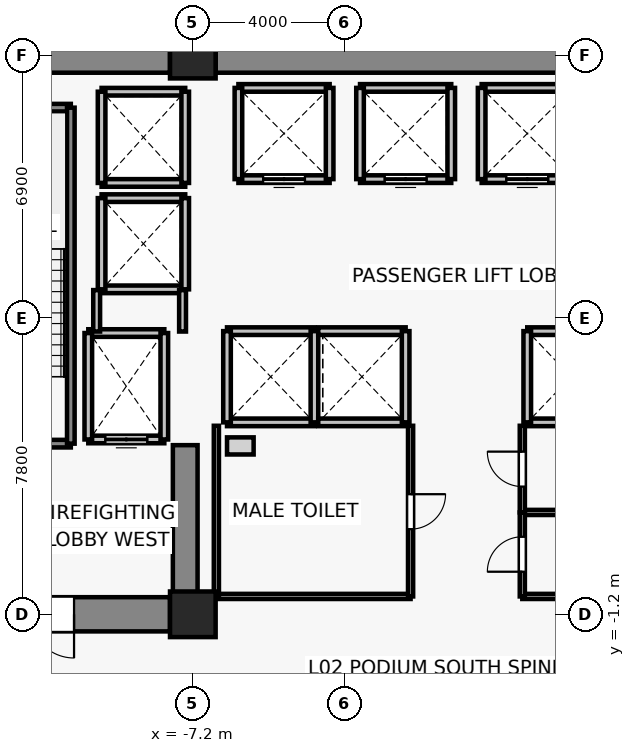
"""IFC4 building model, lengths in metres.
Left out: names, types, materials, properties, quantities, classifications, styles, units other than length and angle.
Written with IfcOpenShell. Run it as: python <this file> out.ifc"""

import sys

from ifc_helpers import new_model, si_unit, direction, frame, frame_2d, origin, origin_2d, place, context, subcontext, project, spatial, rectangle, extrude, source, transform, mapped, element, fill, save


model = new_model("IFC4")
c1 = context("Model", 3, precision=1e-05, world=origin(), true_north=direction((0.0, 1.0)))
c2 = subcontext(c1, "Body", "Model", "MODEL_VIEW")
j1 = project(units=[si_unit("LENGTHUNIT", "METRE"), si_unit("PLANEANGLEUNIT", "RADIAN")], contexts=[c1])
p1 = place(None, origin())
s1 = spatial("IfcSite", under=j1, at=p1, CompositionType="ELEMENT")
p2 = place(p1, origin())
s2 = spatial("IfcBuilding", under=s1, at=p2, CompositionType="ELEMENT")
p3 = place(p2, frame((0.0, 0.0, 9.4)))
s3 = spatial("IfcBuildingStorey", under=s2, at=p3, CompositionType="ELEMENT", Elevation=9.4)
for number, where, z_axis, x_axis in (
    (1, (-7.2, -1.2, 0.0), (0.0, 0.0, 1.0), (1.0, 0.0, 0.0)),
    (2, (-7.2, 13.5, 0.0), (0.0, 0.0, 1.0), (1.0, 0.0, 0.0)),
):
    element("IfcColumn", number, at=place(p3, frame(where, z_axis=z_axis, x_axis=x_axis)), inside=s3, PredefinedType="COLUMN", context=c2, shape_type="SweptSolid", body=[
        extrude(rectangle(XDim=1.2, YDim=1.2, at=origin_2d()), origin(), (0.0, 0.0, 1.0), 4.4),
    ])
p4 = place(p3, frame((-13.8, 13.5, 0.0), z_axis=(0.0, 0.0, 1.0), x_axis=(1.0, 0.0, 0.0)))
e3 = element("IfcWall", 3, at=p4, inside=s3, PredefinedType="SHEAR", context=c2, shape_type="SweptSolid", body=[
    extrude(rectangle(XDim=6.0, YDim=0.9, at=frame_2d((3.0, 0.0))), origin(), (0.0, 0.0, 1.0), 4.1),
])
p5 = place(p3, frame((-6.6, 13.5, 0.0), z_axis=(0.0, 0.0, 1.0), x_axis=(1.0, 0.0, 0.0)))
e4 = element("IfcWall", 4, at=p5, inside=s3, PredefinedType="SHEAR", context=c2, shape_type="SweptSolid", body=[
    extrude(rectangle(XDim=13.2, YDim=0.9, at=frame_2d((6.6, 0.0))), origin(), (0.0, 0.0, 1.0), 4.1),
])
p6 = place(p3, frame((-7.8, -1.2, 0.0), z_axis=(0.0, 0.0, 1.0), x_axis=(-1.0, 0.0, 0.0)))
e5 = element("IfcWall", 5, at=p6, inside=s3, PredefinedType="SHEAR", context=c2, shape_type="SweptSolid", body=[
    extrude(rectangle(XDim=6.0, YDim=0.9, at=frame_2d((3.0, 0.0))), origin(), (0.0, 0.0, 1.0), 4.1),
])
p7 = place(p6, frame((2.525, 0.0, 0.0)))
e6 = element("IfcOpeningElement", 6, at=p7, cuts=e5, PredefinedType="OPENING", context=c2, shape_type="SweptSolid", body=[
    extrude(rectangle(XDim=1.15, YDim=2.15, at=frame_2d((0.575, 1.075))), frame((0.0, 0.46, 0.0), z_axis=(0.0, -1.0, 0.0), x_axis=(1.0, 0.0, 0.0)), (0.0, 0.0, 1.0), 0.92),
])
p8 = place(p3, frame((-7.4, -0.75, 0.0), z_axis=(0.0, 0.0, 1.0), x_axis=(0.0, 1.0, 0.0)))
e7 = element("IfcWall", 7, at=p8, inside=s3, PredefinedType="SHEAR", context=c2, shape_type="SweptSolid", body=[
    extrude(rectangle(XDim=4.0, YDim=0.65, at=frame_2d((2.0, 0.0))), origin(), (0.0, 0.0, 1.0), 4.1),
])
p9 = place(p3, frame((-7.95, 3.4, 0.0), z_axis=(0.0, 0.0, 1.0), x_axis=(-1.0, 0.0, 0.0)))
e8 = element("IfcWall", 8, at=p9, inside=s3, PredefinedType="SOLIDWALL", context=c2, shape_type="SweptSolid", body=[
    extrude(rectangle(XDim=2.0, YDim=0.2, at=frame_2d((1.0, 0.0))), origin(), (0.0, 0.0, 1.0), 4.1),
])
p10 = place(p9, frame((0.45, 0.0, 0.0)))
e9 = element("IfcOpeningElement", 9, at=p10, cuts=e8, PredefinedType="OPENING", context=c2, shape_type="SweptSolid", body=[
    extrude(rectangle(XDim=1.1, YDim=2.2, at=frame_2d((0.55, 1.1))), frame((0.0, 0.11, 0.0), z_axis=(0.0, -1.0, 0.0), x_axis=(1.0, 0.0, 0.0)), (0.0, 0.0, 1.0), 0.22),
])
p11 = place(p3, frame((-9.95, 6.2, 0.0), z_axis=(0.0, 0.0, 1.0), x_axis=(1.0, 0.0, 0.0)))
e10 = element("IfcWall", 10, at=p11, inside=s3, PredefinedType="SOLIDWALL", context=c2, shape_type="SweptSolid", body=[
    extrude(rectangle(XDim=2.0, YDim=0.2, at=frame_2d((1.0, 0.0))), origin(), (0.0, 0.0, 1.0), 4.1),
])
for number, where, z_axis, x_axis in (
    (11, (-9.95, 3.4, 0.0), (0.0, 0.0, 1.0), (0.0, 1.0, 0.0)),
    (12, (-7.95, 6.2, 0.0), (0.0, 0.0, 1.0), (0.0, -1.0, 0.0)),
):
    element("IfcWall", number, at=place(p3, frame(where, z_axis=z_axis, x_axis=x_axis)), inside=s3, PredefinedType="SOLIDWALL", context=c2, shape_type="SweptSolid", body=[
        extrude(rectangle(XDim=2.8, YDim=0.2, at=frame_2d((1.4, 0.0))), origin(), (0.0, 0.0, 1.0), 4.1),
    ])
p12 = place(p3, frame((-3.6, 10.25, 0.0), z_axis=(0.0, 0.0, 1.0), x_axis=(-1.0, 0.0, 0.0)))
e13 = element("IfcWall", 13, at=p12, inside=s3, PredefinedType="SOLIDWALL", context=c2, shape_type="SweptSolid", body=[
    extrude(rectangle(XDim=2.4, YDim=0.2, at=frame_2d((1.2, 0.0))), origin(), (0.0, 0.0, 1.0), 4.1),
])
p13 = place(p12, frame((0.65, 0.0, 0.0)))
e14 = element("IfcOpeningElement", 14, at=p13, cuts=e13, PredefinedType="OPENING", context=c2, shape_type="SweptSolid", body=[
    extrude(rectangle(XDim=1.1, YDim=2.2, at=frame_2d((0.55, 1.1))), frame((0.0, 0.11, 0.0), z_axis=(0.0, -1.0, 0.0), x_axis=(1.0, 0.0, 0.0)), (0.0, 0.0, 1.0), 0.22),
])
for number, where, z_axis, x_axis in (
    (15, (-6.0, 12.65, 0.0), (0.0, 0.0, 1.0), (1.0, 0.0, 0.0)),
    (16, (-6.0, 10.25, 0.0), (0.0, 0.0, 1.0), (0.0, 1.0, 0.0)),
    (17, (-3.6, 12.65, 0.0), (0.0, 0.0, 1.0), (0.0, -1.0, 0.0)),
):
    element("IfcWall", number, at=place(p3, frame(where, z_axis=z_axis, x_axis=x_axis)), inside=s3, PredefinedType="SOLIDWALL", context=c2, shape_type="SweptSolid", body=[
        extrude(rectangle(XDim=2.4, YDim=0.2, at=frame_2d((1.2, 0.0))), origin(), (0.0, 0.0, 1.0), 4.1),
    ])
p14 = place(p3, frame((-0.4, 10.25, 0.0), z_axis=(0.0, 0.0, 1.0), x_axis=(-1.0, 0.0, 0.0)))
e18 = element("IfcWall", 18, at=p14, inside=s3, PredefinedType="SOLIDWALL", context=c2, shape_type="SweptSolid", body=[
    extrude(rectangle(XDim=2.4, YDim=0.2, at=frame_2d((1.2, 0.0))), origin(), (0.0, 0.0, 1.0), 4.1),
])
p15 = place(p14, frame((0.65, 0.0, 0.0)))
e19 = element("IfcOpeningElement", 19, at=p15, cuts=e18, PredefinedType="OPENING", context=c2, shape_type="SweptSolid", body=[
    extrude(rectangle(XDim=1.1, YDim=2.2, at=frame_2d((0.55, 1.1))), frame((0.0, 0.11, 0.0), z_axis=(0.0, -1.0, 0.0), x_axis=(1.0, 0.0, 0.0)), (0.0, 0.0, 1.0), 0.22),
])
p16 = place(p3, frame((-2.8, 12.65, 0.0), z_axis=(0.0, 0.0, 1.0), x_axis=(1.0, 0.0, 0.0)))
e20 = element("IfcWall", 20, at=p16, inside=s3, PredefinedType="SOLIDWALL", context=c2, shape_type="SweptSolid", body=[
    extrude(rectangle(XDim=2.4, YDim=0.2, at=frame_2d((1.2, 0.0))), origin(), (0.0, 0.0, 1.0), 4.1),
])
for number, where, z_axis, x_axis in (
    (21, (-2.8, 10.25, 0.0), (0.0, 0.0, 1.0), (0.0, 1.0, 0.0)),
    (22, (-0.4, 12.65, 0.0), (0.0, 0.0, 1.0), (0.0, -1.0, 0.0)),
):
    element("IfcWall", number, at=place(p3, frame(where, z_axis=z_axis, x_axis=x_axis)), inside=s3, PredefinedType="SOLIDWALL", context=c2, shape_type="SweptSolid", body=[
        extrude(rectangle(XDim=2.4, YDim=0.2, at=frame_2d((1.2, 0.0))), origin(), (0.0, 0.0, 1.0), 4.1),
    ])
p17 = place(p3, frame((2.8, 10.25, 0.0), z_axis=(0.0, 0.0, 1.0), x_axis=(-1.0, 0.0, 0.0)))
e23 = element("IfcWall", 23, at=p17, inside=s3, PredefinedType="SOLIDWALL", context=c2, shape_type="SweptSolid", body=[
    extrude(rectangle(XDim=2.4, YDim=0.2, at=frame_2d((1.2, 0.0))), origin(), (0.0, 0.0, 1.0), 4.1),
])
p18 = place(p17, frame((0.65, 0.0, 0.0)))
e24 = element("IfcOpeningElement", 24, at=p18, cuts=e23, PredefinedType="OPENING", context=c2, shape_type="SweptSolid", body=[
    extrude(rectangle(XDim=1.1, YDim=2.2, at=frame_2d((0.55, 1.1))), frame((0.0, 0.11, 0.0), z_axis=(0.0, -1.0, 0.0), x_axis=(1.0, 0.0, 0.0)), (0.0, 0.0, 1.0), 0.22),
])
p19 = place(p3, frame((0.4, 12.65, 0.0), z_axis=(0.0, 0.0, 1.0), x_axis=(1.0, 0.0, 0.0)))
e25 = element("IfcWall", 25, at=p19, inside=s3, PredefinedType="SOLIDWALL", context=c2, shape_type="SweptSolid", body=[
    extrude(rectangle(XDim=2.4, YDim=0.2, at=frame_2d((1.2, 0.0))), origin(), (0.0, 0.0, 1.0), 4.1),
])
p20 = place(p3, frame((0.4, 10.25, 0.0), z_axis=(0.0, 0.0, 1.0), x_axis=(0.0, 1.0, 0.0)))
e26 = element("IfcWall", 26, at=p20, inside=s3, PredefinedType="SOLIDWALL", context=c2, shape_type="SweptSolid", body=[
    extrude(rectangle(XDim=2.4, YDim=0.2, at=frame_2d((1.2, 0.0))), origin(), (0.0, 0.0, 1.0), 4.1),
])
for number, where, z_axis, x_axis in (
    (27, (-4.0, 3.85, 0.0), (0.0, 0.0, 1.0), (-1.0, 0.0, 0.0)),
    (28, (-6.3, 6.25, 0.0), (0.0, 0.0, 1.0), (1.0, 0.0, 0.0)),
):
    element("IfcWall", number, at=place(p3, frame(where, z_axis=z_axis, x_axis=x_axis)), inside=s3, PredefinedType="SOLIDWALL", context=c2, shape_type="SweptSolid", body=[
        extrude(rectangle(XDim=2.3, YDim=0.2, at=frame_2d((1.15, 0.0))), origin(), (0.0, 0.0, 1.0), 4.1),
    ])
for number, where, z_axis, x_axis in (
    (29, (-6.3, 3.85, 0.0), (0.0, 0.0, 1.0), (0.0, 1.0, 0.0)),
    (30, (-4.0, 6.25, 0.0), (0.0, 0.0, 1.0), (0.0, -1.0, 0.0)),
):
    element("IfcWall", number, at=place(p3, frame(where, z_axis=z_axis, x_axis=x_axis)), inside=s3, PredefinedType="SOLIDWALL", context=c2, shape_type="SweptSolid", body=[
        extrude(rectangle(XDim=2.4, YDim=0.2, at=frame_2d((1.2, 0.0))), origin(), (0.0, 0.0, 1.0), 4.1),
    ])
for number, where, z_axis, x_axis in (
    (31, (-1.6, 3.85, 0.0), (0.0, 0.0, 1.0), (-1.0, 0.0, 0.0)),
    (32, (-3.9, 6.25, 0.0), (0.0, 0.0, 1.0), (1.0, 0.0, 0.0)),
):
    element("IfcWall", number, at=place(p3, frame(where, z_axis=z_axis, x_axis=x_axis)), inside=s3, PredefinedType="SOLIDWALL", context=c2, shape_type="SweptSolid", body=[
        extrude(rectangle(XDim=2.3, YDim=0.2, at=frame_2d((1.15, 0.0))), origin(), (0.0, 0.0, 1.0), 4.1),
    ])
p21 = place(p3, frame((-1.6, 6.25, 0.0), z_axis=(0.0, 0.0, 1.0), x_axis=(0.0, -1.0, 0.0)))
e33 = element("IfcWall", 33, at=p21, inside=s3, PredefinedType="SOLIDWALL", context=c2, shape_type="SweptSolid", body=[
    extrude(rectangle(XDim=2.4, YDim=0.2, at=frame_2d((1.2, 0.0))), origin(), (0.0, 0.0, 1.0), 4.1),
])
for number, where, z_axis, x_axis in (
    (34, (3.9, 3.85, 0.0), (0.0, 0.0, 1.0), (-1.0, 0.0, 0.0)),
    (35, (1.6, 6.25, 0.0), (0.0, 0.0, 1.0), (1.0, 0.0, 0.0)),
):
    element("IfcWall", number, at=place(p3, frame(where, z_axis=z_axis, x_axis=x_axis)), inside=s3, PredefinedType="SOLIDWALL", context=c2, shape_type="SweptSolid", body=[
        extrude(rectangle(XDim=2.3, YDim=0.2, at=frame_2d((1.15, 0.0))), origin(), (0.0, 0.0, 1.0), 4.1),
    ])
p22 = place(p3, frame((1.6, 3.85, 0.0), z_axis=(0.0, 0.0, 1.0), x_axis=(0.0, 1.0, 0.0)))
e36 = element("IfcWall", 36, at=p22, inside=s3, PredefinedType="SOLIDWALL", context=c2, shape_type="SweptSolid", body=[
    extrude(rectangle(XDim=2.4, YDim=0.2, at=frame_2d((1.2, 0.0))), origin(), (0.0, 0.0, 1.0), 4.1),
])
for number, where, z_axis, x_axis in (
    (37, (-7.4, 7.35, 0.0), (0.0, 0.0, 1.0), (-1.0, 0.0, 0.0)),
    (38, (-9.6, 9.75, 0.0), (0.0, 0.0, 1.0), (1.0, 0.0, 0.0)),
):
    element("IfcWall", number, at=place(p3, frame(where, z_axis=z_axis, x_axis=x_axis)), inside=s3, PredefinedType="SOLIDWALL", context=c2, shape_type="SweptSolid", body=[
        extrude(rectangle(XDim=2.2, YDim=0.2, at=frame_2d((1.1, 0.0))), origin(), (0.0, 0.0, 1.0), 3.19),
    ])
p23 = place(p3, frame((-9.6, 7.35, 0.0), z_axis=(0.0, 0.0, 1.0), x_axis=(0.0, 1.0, 0.0)))
e39 = element("IfcWall", 39, at=p23, inside=s3, PredefinedType="SOLIDWALL", context=c2, shape_type="SweptSolid", body=[
    extrude(rectangle(XDim=2.4, YDim=0.2, at=frame_2d((1.2, 0.0))), origin(), (0.0, 0.0, 1.0), 4.1),
])
p24 = place(p3, frame((-7.4, 9.75, 0.0), z_axis=(0.0, 0.0, 1.0), x_axis=(0.0, -1.0, 0.0)))
e40 = element("IfcWall", 40, at=p24, inside=s3, PredefinedType="SOLIDWALL", context=c2, shape_type="SweptSolid", body=[
    extrude(rectangle(XDim=2.4, YDim=0.2, at=frame_2d((1.2, 0.0))), origin(), (0.0, 0.0, 1.0), 3.19),
])
for number, where, z_axis, x_axis in (
    (41, (-7.4, 10.15, 0.0), (0.0, 0.0, 1.0), (-1.0, 0.0, 0.0)),
    (42, (-9.6, 12.55, 0.0), (0.0, 0.0, 1.0), (1.0, 0.0, 0.0)),
):
    element("IfcWall", number, at=place(p3, frame(where, z_axis=z_axis, x_axis=x_axis)), inside=s3, PredefinedType="SOLIDWALL", context=c2, shape_type="SweptSolid", body=[
        extrude(rectangle(XDim=2.2, YDim=0.2, at=frame_2d((1.1, 0.0))), origin(), (0.0, 0.0, 1.0), 3.19),
    ])
p25 = place(p3, frame((-9.6, 10.15, 0.0), z_axis=(0.0, 0.0, 1.0), x_axis=(0.0, 1.0, 0.0)))
e43 = element("IfcWall", 43, at=p25, inside=s3, PredefinedType="SOLIDWALL", context=c2, shape_type="SweptSolid", body=[
    extrude(rectangle(XDim=2.4, YDim=0.2, at=frame_2d((1.2, 0.0))), origin(), (0.0, 0.0, 1.0), 4.1),
])
p26 = place(p3, frame((-7.4, 12.55, 0.0), z_axis=(0.0, 0.0, 1.0), x_axis=(0.0, -1.0, 0.0)))
e44 = element("IfcWall", 44, at=p26, inside=s3, PredefinedType="SOLIDWALL", context=c2, shape_type="SweptSolid", body=[
    extrude(rectangle(XDim=2.4, YDim=0.2, at=frame_2d((1.2, 0.0))), origin(), (0.0, 0.0, 1.0), 3.19),
])
p27 = place(p3, frame((-10.41, 3.29, 0.0), z_axis=(0.0, 0.0, 1.0), x_axis=(-1.0, 0.0, 0.0)))
e45 = element("IfcWall", 45, at=p27, inside=s3, PredefinedType="SOLIDWALL", context=c2, shape_type="SweptSolid", body=[
    extrude(rectangle(XDim=3.52, YDim=0.2, at=frame_2d((1.76, 0.0))), origin(), (0.0, 0.0, 1.0), 4.1),
])
p28 = place(p27, frame((1.165, 0.0, 0.0)))
e46 = element("IfcOpeningElement", 46, at=p28, cuts=e45, PredefinedType="OPENING", context=c2, shape_type="SweptSolid", body=[
    extrude(rectangle(XDim=1.15, YDim=2.15, at=frame_2d((0.575, 1.075))), frame((0.0, 0.11, 0.0), z_axis=(0.0, -1.0, 0.0), x_axis=(1.0, 0.0, 0.0)), (0.0, 0.0, 1.0), 0.22),
])
p29 = place(p3, frame((-13.93, 12.13, 0.0), z_axis=(0.0, 0.0, 1.0), x_axis=(1.0, 0.0, 0.0)))
e47 = element("IfcWall", 47, at=p29, inside=s3, PredefinedType="SOLIDWALL", context=c2, shape_type="SweptSolid", body=[
    extrude(rectangle(XDim=3.52, YDim=0.2, at=frame_2d((1.76, 0.0))), origin(), (0.0, 0.0, 1.0), 4.1),
])
p30 = place(p3, frame((-10.41, 12.13, 0.0), z_axis=(0.0, 0.0, 1.0), x_axis=(0.0, -1.0, 0.0)))
e48 = element("IfcWall", 48, at=p30, inside=s3, PredefinedType="SOLIDWALL", context=c2, shape_type="SweptSolid", body=[
    extrude(rectangle(XDim=8.84, YDim=0.2, at=frame_2d((4.42, 0.0))), origin(), (0.0, 0.0, 1.0), 4.1),
])
p31 = place(p3, frame((-9.73, 6.24, 0.0), z_axis=(0.0, 0.0, 1.0), x_axis=(0.0, 1.0, 0.0)))
e49 = element("IfcWall", 49, at=p31, inside=s3, PredefinedType="PARTITIONING", context=c2, shape_type="SweptSolid", body=[
    extrude(rectangle(XDim=1.09, YDim=0.18, at=frame_2d((0.545, 0.0))), origin(), (0.0, 0.0, 1.0), 4.1),
])
p32 = place(p3, frame((-7.47, 7.33, 0.0), z_axis=(0.0, 0.0, 1.0), x_axis=(0.0, -1.0, 0.0)))
e50 = element("IfcWall", 50, at=p32, inside=s3, PredefinedType="PARTITIONING", context=c2, shape_type="SweptSolid", body=[
    extrude(rectangle(XDim=1.09, YDim=0.18, at=frame_2d((0.545, 0.0))), origin(), (0.0, 0.0, 1.0), 3.19),
])
p33 = place(p3, frame((-1.47, -0.73, 0.0), z_axis=(0.0, 0.0, 1.0), x_axis=(-1.0, 0.0, 0.0)))
e51 = element("IfcWall", 51, at=p33, inside=s3, PredefinedType="PARTITIONING", context=c2, shape_type="SweptSolid", body=[
    extrude(rectangle(XDim=5.11, YDim=0.135, at=frame_2d((2.555, 0.0))), origin(), (0.0, 0.0, 1.0), 4.1),
])
p34 = place(p3, frame((-6.58, -0.73, 0.0), z_axis=(0.0, 0.0, 1.0), x_axis=(0.0, 1.0, 0.0)))
e52 = element("IfcWall", 52, at=p34, inside=s3, PredefinedType="PARTITIONING", context=c2, shape_type="SweptSolid", body=[
    extrude(rectangle(XDim=4.49, YDim=0.135, at=frame_2d((2.245, 0.0))), origin(), (0.0, 0.0, 1.0), 3.473),
])
p35 = place(p3, frame((-1.47, 3.76, 0.0), z_axis=(0.0, 0.0, 1.0), x_axis=(0.0, -1.0, 0.0)))
e53 = element("IfcWall", 53, at=p35, inside=s3, PredefinedType="PARTITIONING", context=c2, shape_type="SweptSolid", body=[
    extrude(rectangle(XDim=4.49, YDim=0.135, at=frame_2d((2.245, 0.0))), origin(), (0.0, 0.0, 1.0), 3.473),
])
p36 = place(p35, frame((1.8, 0.0, 0.0)))
e54 = element("IfcOpeningElement", 54, at=p36, cuts=e53, PredefinedType="OPENING", context=c2, shape_type="SweptSolid", body=[
    extrude(rectangle(XDim=0.92, YDim=2.1, at=frame_2d((0.46, 1.05))), frame((0.0, 0.077, 0.0), z_axis=(0.0, -1.0, 0.0), x_axis=(1.0, 0.0, 0.0)), (0.0, 0.0, 1.0), 0.155),
])
p37 = place(p3, frame((6.58, 1.48, 0.0), z_axis=(0.0, 0.0, 1.0), x_axis=(-1.0, 0.0, 0.0)))
e55 = element("IfcWall", 55, at=p37, inside=s3, PredefinedType="PARTITIONING", context=c2, shape_type="SweptSolid", body=[
    extrude(rectangle(XDim=5.11, YDim=0.135, at=frame_2d((2.555, 0.0))), origin(), (0.0, 0.0, 1.0), 4.1),
])
p38 = place(p3, frame((1.47, 1.48, 0.0), z_axis=(0.0, 0.0, 1.0), x_axis=(0.0, 1.0, 0.0)))
e56 = element("IfcWall", 56, at=p38, inside=s3, PredefinedType="PARTITIONING", context=c2, shape_type="SweptSolid", body=[
    extrude(rectangle(XDim=2.28, YDim=0.135, at=frame_2d((1.14, 0.0))), origin(), (0.0, 0.0, 1.0), 3.473),
])
p39 = place(p38, frame((0.68, 0.0, 0.0)))
e57 = element("IfcOpeningElement", 57, at=p39, cuts=e56, PredefinedType="OPENING", context=c2, shape_type="SweptSolid", body=[
    extrude(rectangle(XDim=0.92, YDim=2.1, at=frame_2d((0.46, 1.05))), frame((0.0, 0.077, 0.0), z_axis=(0.0, -1.0, 0.0), x_axis=(1.0, 0.0, 0.0)), (0.0, 0.0, 1.0), 0.155),
])
p40 = place(p3, frame((4.18, -0.73, 0.0), z_axis=(0.0, 0.0, 1.0), x_axis=(-1.0, 0.0, 0.0)))
e58 = element("IfcWall", 58, at=p40, inside=s3, PredefinedType="PARTITIONING", context=c2, shape_type="SweptSolid", body=[
    extrude(rectangle(XDim=2.71, YDim=0.135, at=frame_2d((1.355, 0.0))), origin(), (0.0, 0.0, 1.0), 4.1),
])
p41 = place(p3, frame((1.47, -0.73, 0.0), z_axis=(0.0, 0.0, 1.0), x_axis=(0.0, 1.0, 0.0)))
e59 = element("IfcWall", 59, at=p41, inside=s3, PredefinedType="PARTITIONING", context=c2, shape_type="SweptSolid", body=[
    extrude(rectangle(XDim=2.21, YDim=0.135, at=frame_2d((1.105, 0.0))), origin(), (0.0, 0.0, 1.0), 4.1),
])
p42 = place(p41, frame((0.65, 0.0, 0.0)))
e60 = element("IfcOpeningElement", 60, at=p42, cuts=e59, PredefinedType="OPENING", context=c2, shape_type="SweptSolid", body=[
    extrude(rectangle(XDim=0.92, YDim=2.1, at=frame_2d((0.46, 1.05))), frame((0.0, 0.077, 0.0), z_axis=(0.0, -1.0, 0.0), x_axis=(1.0, 0.0, 0.0)), (0.0, 0.0, 1.0), 0.155),
])
m1 = source(origin(), c2, "Body", "SweptSolid", [
    extrude(rectangle(XDim=1.1, YDim=2.2, at=frame_2d((0.55, 1.1))), frame((0.0, 0.025, 0.0), z_axis=(0.0, -1.0, 0.0), x_axis=(1.0, 0.0, 0.0)), (0.0, 0.0, 1.0), 0.05),
])
p43 = place(p10, origin())
e61 = element("IfcDoor", 61, at=p43, inside=s3, OperationType="DOUBLE_DOOR_SLIDING", PredefinedType="DOOR", context=c2, shape_type="MappedRepresentation", body=[
    mapped(m1, transform((0.0, 0.0, 0.0), x_axis=(1.0, 0.0, 0.0), y_axis=(0.0, 1.0, 0.0), z_axis=(0.0, 0.0, 1.0), scale=1.0)),
])
fill(e9, e61)
p44 = place(p13, origin())
e62 = element("IfcDoor", 62, at=p44, inside=s3, OperationType="DOUBLE_DOOR_SLIDING", PredefinedType="DOOR", context=c2, shape_type="MappedRepresentation", body=[
    mapped(m1, transform((0.0, 0.0, 0.0), x_axis=(1.0, 0.0, 0.0), y_axis=(0.0, 1.0, 0.0), z_axis=(0.0, 0.0, 1.0), scale=1.0)),
])
fill(e14, e62)
p45 = place(p15, origin())
e63 = element("IfcDoor", 63, at=p45, inside=s3, OperationType="DOUBLE_DOOR_SLIDING", PredefinedType="DOOR", context=c2, shape_type="MappedRepresentation", body=[
    mapped(m1, transform((0.0, 0.0, 0.0), x_axis=(1.0, 0.0, 0.0), y_axis=(0.0, 1.0, 0.0), z_axis=(0.0, 0.0, 1.0), scale=1.0)),
])
fill(e19, e63)
p46 = place(p18, origin())
e64 = element("IfcDoor", 64, at=p46, inside=s3, OperationType="DOUBLE_DOOR_SLIDING", PredefinedType="DOOR", context=c2, shape_type="MappedRepresentation", body=[
    mapped(m1, transform((0.0, 0.0, 0.0), x_axis=(1.0, 0.0, 0.0), y_axis=(0.0, 1.0, 0.0), z_axis=(0.0, 0.0, 1.0), scale=1.0)),
])
fill(e24, e64)
m2 = source(origin(), c2, "Body", "SweptSolid", [
    extrude(rectangle(XDim=1.15, YDim=2.15, at=frame_2d((0.575, 1.075))), frame((0.0, 0.025, 0.0), z_axis=(0.0, -1.0, 0.0), x_axis=(1.0, 0.0, 0.0)), (0.0, 0.0, 1.0), 0.05),
])
p47 = place(p7, origin())
e65 = element("IfcDoor", 65, at=p47, inside=s3, OperationType="SINGLE_SWING_LEFT", PredefinedType="DOOR", context=c2, shape_type="MappedRepresentation", body=[
    mapped(m2, transform((0.0, 0.0, 0.0), x_axis=(1.0, 0.0, 0.0), y_axis=(0.0, 1.0, 0.0), z_axis=(0.0, 0.0, 1.0), scale=1.0)),
])
fill(e6, e65)
m3 = source(origin(), c2, "Body", "SweptSolid", [
    extrude(rectangle(XDim=0.92, YDim=2.1, at=frame_2d((0.46, 1.05))), frame((0.0, 0.025, 0.0), z_axis=(0.0, -1.0, 0.0), x_axis=(1.0, 0.0, 0.0)), (0.0, 0.0, 1.0), 0.05),
])
p48 = place(p36, origin())
e66 = element("IfcDoor", 66, at=p48, inside=s3, OperationType="SINGLE_SWING_LEFT", PredefinedType="DOOR", context=c2, shape_type="MappedRepresentation", body=[
    mapped(m3, transform((0.0, 0.0, 0.0), x_axis=(1.0, 0.0, 0.0), y_axis=(0.0, 1.0, 0.0), z_axis=(0.0, 0.0, 1.0), scale=1.0)),
])
fill(e54, e66)
p49 = place(p39, origin())
e67 = element("IfcDoor", 67, at=p49, inside=s3, OperationType="SINGLE_SWING_RIGHT", PredefinedType="DOOR", context=c2, shape_type="MappedRepresentation", body=[
    mapped(m3, transform((0.0, 0.0, 0.0), x_axis=(1.0, 0.0, 0.0), y_axis=(0.0, 1.0, 0.0), z_axis=(0.0, 0.0, 1.0), scale=1.0)),
])
fill(e57, e67)
p50 = place(p42, origin())
e68 = element("IfcDoor", 68, at=p50, inside=s3, OperationType="SINGLE_SWING_LEFT", PredefinedType="DOOR", context=c2, shape_type="MappedRepresentation", body=[
    mapped(m3, transform((0.0, 0.0, 0.0), x_axis=(1.0, 0.0, 0.0), y_axis=(0.0, 1.0, 0.0), z_axis=(0.0, 0.0, 1.0), scale=1.0)),
])
fill(e60, e68)
save(model, sys.argv[1])
